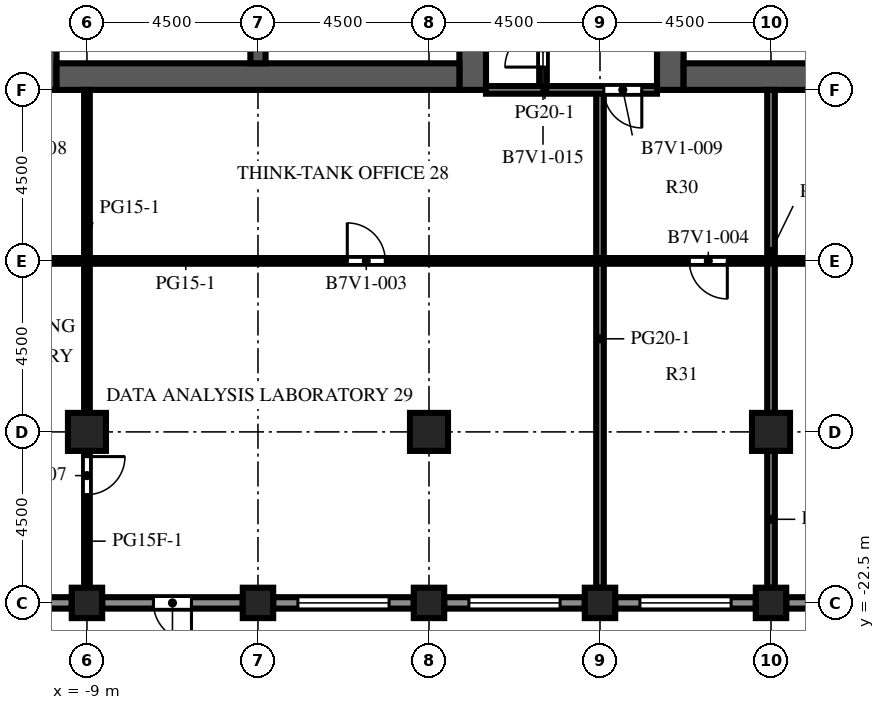
"""IFC4 building model, lengths in metres.
Left out: names, types, materials, properties, quantities, classifications, styles, units other than length and angle.
Written with IfcOpenShell. Run it as: python <this file> out.ifc"""

import sys

from ifc_helpers import new_model, si_unit, direction, frame, frame_2d, origin, origin_2d, place, context, subcontext, project, spatial, rectangle, extrude, element, fill, save


model = new_model("IFC4")
c1 = context("Model", 3, precision=1e-05, world=origin(), true_north=direction((0.0, 1.0)))
c2 = subcontext(c1, "Body", "Model", "MODEL_VIEW")
j1 = project(units=[si_unit("LENGTHUNIT", "METRE"), si_unit("PLANEANGLEUNIT", "RADIAN")], contexts=[c1])
p1 = place(None, origin())
s1 = spatial("IfcSite", under=j1, at=p1, CompositionType="ELEMENT")
p2 = place(p1, origin())
s2 = spatial("IfcBuilding", under=s1, at=p2, CompositionType="ELEMENT")
p3 = place(p2, frame((0.0, 0.0, 252.1)))
s3 = spatial("IfcBuildingStorey", under=s2, at=p3, CompositionType="ELEMENT", Elevation=252.1)
for number, where, z_axis, x_axis in (
    (1, (-9.0, -22.5, 0.0), (0.0, 0.0, 1.0), (1.0, 0.0, 0.0)),
    (2, (-4.5, -22.5, 0.0), (0.0, 0.0, 1.0), (1.0, 0.0, 0.0)),
    (3, (0.0, -22.5, 0.0), (0.0, 0.0, 1.0), (1.0, 0.0, 0.0)),
    (4, (4.5, -22.5, 0.0), (0.0, 0.0, 1.0), (1.0, 0.0, 0.0)),
    (5, (9.0, -22.5, 0.0), (0.0, 0.0, 1.0), (1.0, 0.0, 0.0)),
):
    element("IfcColumn", number, at=place(p3, frame(where, z_axis=z_axis, x_axis=x_axis)), inside=s3, PredefinedType="COLUMN", context=c2, shape_type="SweptSolid", body=[
        extrude(rectangle(XDim=0.8, YDim=0.8, at=origin_2d()), origin(), (0.0, 0.0, 1.0), 4.1),
    ])
for number, where, z_axis, x_axis in (
    (6, (-9.0, -18.0, 0.0), (0.0, 0.0, 1.0), (1.0, 0.0, 0.0)),
    (7, (0.0, -18.0, 0.0), (0.0, 0.0, 1.0), (1.0, 0.0, 0.0)),
    (8, (9.0, -18.0, 0.0), (0.0, 0.0, 1.0), (1.0, 0.0, 0.0)),
):
    element("IfcColumn", number, at=place(p3, frame(where, z_axis=z_axis, x_axis=x_axis)), inside=s3, PredefinedType="COLUMN", context=c2, shape_type="SweptSolid", body=[
        extrude(rectangle(XDim=1.0, YDim=1.0, at=origin_2d()), origin(), (0.0, 0.0, 1.0), 4.1),
    ])
p4 = place(p3, frame((-10.15, -9.0, 0.0), z_axis=(0.0, 0.0, 1.0), x_axis=(0.0, 1.0, 0.0)))
e9 = element("IfcWall", 9, at=p4, inside=s3, PredefinedType="SHEAR", context=c2, shape_type="SweptSolid", body=[
    extrude(rectangle(XDim=27.5, YDim=0.7, at=frame_2d((13.75, 0.0))), origin(), (0.0, 0.0, 1.0), 4.1),
])
p5 = place(p4, frame((12.55, 0.0, 0.0)))
e10 = element("IfcOpeningElement", 10, at=p5, cuts=e9, PredefinedType="OPENING", context=c2, shape_type="SweptSolid", body=[
    extrude(rectangle(XDim=2.4, YDim=2.4, at=frame_2d((1.2, 1.2))), frame((0.0, 0.36, 0.0), z_axis=(0.0, -1.0, 0.0), x_axis=(1.0, 0.0, 0.0)), (0.0, 0.0, 1.0), 0.72),
])
p6 = place(p4, frame((6.825, 0.0, 0.0)))
e11 = element("IfcOpeningElement", 11, at=p6, cuts=e9, PredefinedType="OPENING", context=c2, shape_type="SweptSolid", body=[
    extrude(rectangle(XDim=1.2, YDim=2.1, at=frame_2d((0.6, 1.05))), frame((0.0, 0.36, 0.0), z_axis=(0.0, -1.0, 0.0), x_axis=(1.0, 0.0, 0.0)), (0.0, 0.0, 1.0), 0.72),
])
p7 = place(p4, frame((19.475, 0.0, 0.0)))
e12 = element("IfcOpeningElement", 12, at=p7, cuts=e9, PredefinedType="OPENING", context=c2, shape_type="SweptSolid", body=[
    extrude(rectangle(XDim=1.2, YDim=2.1, at=frame_2d((0.6, 1.05))), frame((0.0, 0.36, 0.0), z_axis=(0.0, -1.0, 0.0), x_axis=(1.0, 0.0, 0.0)), (0.0, 0.0, 1.0), 0.72),
])
p8 = place(p3, frame((1.15, -9.0, 0.0), z_axis=(0.0, 0.0, 1.0), x_axis=(0.0, 1.0, 0.0)))
e13 = element("IfcWall", 13, at=p8, inside=s3, PredefinedType="SHEAR", context=c2, shape_type="SweptSolid", body=[
    extrude(rectangle(XDim=27.5, YDim=0.7, at=frame_2d((13.75, 0.0))), origin(), (0.0, 0.0, 1.0), 4.1),
])
p9 = place(p8, frame((12.55, 0.0, 0.0)))
e14 = element("IfcOpeningElement", 14, at=p9, cuts=e13, PredefinedType="OPENING", context=c2, shape_type="SweptSolid", body=[
    extrude(rectangle(XDim=2.4, YDim=2.4, at=frame_2d((1.2, 1.2))), frame((0.0, 0.36, 0.0), z_axis=(0.0, -1.0, 0.0), x_axis=(1.0, 0.0, 0.0)), (0.0, 0.0, 1.0), 0.72),
])
p10 = place(p8, frame((3.9, 0.0, 0.0)))
e15 = element("IfcOpeningElement", 15, at=p10, cuts=e13, PredefinedType="OPENING", context=c2, shape_type="SweptSolid", body=[
    extrude(rectangle(XDim=1.2, YDim=2.1, at=frame_2d((0.6, 1.05))), frame((0.0, 0.36, 0.0), z_axis=(0.0, -1.0, 0.0), x_axis=(1.0, 0.0, 0.0)), (0.0, 0.0, 1.0), 0.72),
])
p11 = place(p8, frame((22.4, 0.0, 0.0)))
e16 = element("IfcOpeningElement", 16, at=p11, cuts=e13, PredefinedType="OPENING", context=c2, shape_type="SweptSolid", body=[
    extrude(rectangle(XDim=1.2, YDim=2.1, at=frame_2d((0.6, 1.05))), frame((0.0, 0.36, 0.0), z_axis=(0.0, -1.0, 0.0), x_axis=(1.0, 0.0, 0.0)), (0.0, 0.0, 1.0), 0.72),
])
p12 = place(p3, frame((-9.8, -8.65, 0.0), z_axis=(0.0, 0.0, 1.0), x_axis=(1.0, 0.0, 0.0)))
e17 = element("IfcWall", 17, at=p12, inside=s3, PredefinedType="SHEAR", context=c2, shape_type="SweptSolid", body=[
    extrude(rectangle(XDim=10.6, YDim=0.7, at=frame_2d((5.3, 0.0))), origin(), (0.0, 0.0, 1.0), 4.1),
])
p13 = place(p3, frame((-4.5, -8.3, 0.0), z_axis=(0.0, 0.0, 1.0), x_axis=(0.0, 1.0, 0.0)))
e18 = element("IfcWall", 18, at=p13, inside=s3, PredefinedType="SHEAR", context=c2, shape_type="SweptSolid", body=[
    extrude(rectangle(XDim=7.6, YDim=0.4, at=frame_2d((3.8, 0.0))), origin(), (0.0, 0.0, 1.0), 4.1),
])
p14 = place(p3, frame((6.35, -9.0, 0.0), z_axis=(0.0, 0.0, 1.0), x_axis=(0.0, 1.0, 0.0)))
e19 = element("IfcWall", 19, at=p14, inside=s3, PredefinedType="SHEAR", context=c2, shape_type="SweptSolid", body=[
    extrude(rectangle(XDim=27.5, YDim=0.7, at=frame_2d((13.75, 0.0))), origin(), (0.0, 0.0, 1.0), 4.1),
])
p15 = place(p14, frame((12.55, 0.0, 0.0)))
e20 = element("IfcOpeningElement", 20, at=p15, cuts=e19, PredefinedType="OPENING", context=c2, shape_type="SweptSolid", body=[
    extrude(rectangle(XDim=2.4, YDim=2.4, at=frame_2d((1.2, 1.2))), frame((0.0, 0.36, 0.0), z_axis=(0.0, -1.0, 0.0), x_axis=(1.0, 0.0, 0.0)), (0.0, 0.0, 1.0), 0.72),
])
p16 = place(p14, frame((3.9, 0.0, 0.0)))
e21 = element("IfcOpeningElement", 21, at=p16, cuts=e19, PredefinedType="OPENING", context=c2, shape_type="SweptSolid", body=[
    extrude(rectangle(XDim=1.2, YDim=2.1, at=frame_2d((0.6, 1.05))), frame((0.0, 0.36, 0.0), z_axis=(0.0, -1.0, 0.0), x_axis=(1.0, 0.0, 0.0)), (0.0, 0.0, 1.0), 0.72),
])
p17 = place(p14, frame((22.4, 0.0, 0.0)))
e22 = element("IfcOpeningElement", 22, at=p17, cuts=e19, PredefinedType="OPENING", context=c2, shape_type="SweptSolid", body=[
    extrude(rectangle(XDim=1.2, YDim=2.1, at=frame_2d((0.6, 1.05))), frame((0.0, 0.36, 0.0), z_axis=(0.0, -1.0, 0.0), x_axis=(1.0, 0.0, 0.0)), (0.0, 0.0, 1.0), 0.72),
])
p18 = place(p3, frame((6.7, -8.65, 0.0), z_axis=(0.0, 0.0, 1.0), x_axis=(1.0, 0.0, 0.0)))
e23 = element("IfcWall", 23, at=p18, inside=s3, PredefinedType="SHEAR", context=c2, shape_type="SweptSolid", body=[
    extrude(rectangle(XDim=10.6, YDim=0.7, at=frame_2d((5.3, 0.0))), origin(), (0.0, 0.0, 1.0), 4.1),
])
p19 = place(p3, frame((-9.4, -22.5, 0.0), z_axis=(0.0, 0.0, 1.0), x_axis=(-1.0, 0.0, 0.0)))
e24 = element("IfcWall", 24, at=p19, inside=s3, PredefinedType="SOLIDWALL", context=c2, shape_type="SweptSolid", body=[
    extrude(rectangle(XDim=3.7, YDim=0.3, at=frame_2d((1.85, 0.0))), origin(), (0.0, 0.0, 1.0), 2.85),
])
p20 = place(p19, frame((0.65, 0.0, 0.8)))
e25 = element("IfcOpeningElement", 25, at=p20, cuts=e24, PredefinedType="OPENING", context=c2, shape_type="SweptSolid", body=[
    extrude(rectangle(XDim=2.4, YDim=1.7, at=frame_2d((1.2, 0.85))), frame((0.0, 0.16, 0.0), z_axis=(0.0, -1.0, 0.0), x_axis=(1.0, 0.0, 0.0)), (0.0, 0.0, 1.0), 0.32),
])
p21 = place(p3, frame((-4.9, -22.5, 0.0), z_axis=(0.0, 0.0, 1.0), x_axis=(-1.0, 0.0, 0.0)))
e26 = element("IfcWall", 26, at=p21, inside=s3, PredefinedType="SOLIDWALL", context=c2, shape_type="SweptSolid", body=[
    extrude(rectangle(XDim=3.7, YDim=0.3, at=frame_2d((1.85, 0.0))), origin(), (0.0, 0.0, 1.0), 2.85),
])
p22 = place(p21, frame((1.35, 0.0, 0.0)))
e27 = element("IfcOpeningElement", 27, at=p22, cuts=e26, PredefinedType="OPENING", context=c2, shape_type="SweptSolid", body=[
    extrude(rectangle(XDim=1.0, YDim=2.2, at=frame_2d((0.5, 1.1))), frame((0.0, 0.16, 0.0), z_axis=(0.0, -1.0, 0.0), x_axis=(1.0, 0.0, 0.0)), (0.0, 0.0, 1.0), 0.32),
])
p23 = place(p3, frame((-0.4, -22.5, 0.0), z_axis=(0.0, 0.0, 1.0), x_axis=(-1.0, 0.0, 0.0)))
e28 = element("IfcWall", 28, at=p23, inside=s3, PredefinedType="SOLIDWALL", context=c2, shape_type="SweptSolid", body=[
    extrude(rectangle(XDim=3.7, YDim=0.3, at=frame_2d((1.85, 0.0))), origin(), (0.0, 0.0, 1.0), 2.85),
])
p24 = place(p23, frame((0.65, 0.0, 0.8)))
e29 = element("IfcOpeningElement", 29, at=p24, cuts=e28, PredefinedType="OPENING", context=c2, shape_type="SweptSolid", body=[
    extrude(rectangle(XDim=2.4, YDim=1.7, at=frame_2d((1.2, 0.85))), frame((0.0, 0.16, 0.0), z_axis=(0.0, -1.0, 0.0), x_axis=(1.0, 0.0, 0.0)), (0.0, 0.0, 1.0), 0.32),
])
p25 = place(p3, frame((4.1, -22.5, 0.0), z_axis=(0.0, 0.0, 1.0), x_axis=(-1.0, 0.0, 0.0)))
e30 = element("IfcWall", 30, at=p25, inside=s3, PredefinedType="SOLIDWALL", context=c2, shape_type="SweptSolid", body=[
    extrude(rectangle(XDim=3.7, YDim=0.3, at=frame_2d((1.85, 0.0))), origin(), (0.0, 0.0, 1.0), 2.85),
])
p26 = place(p25, frame((0.65, 0.0, 0.8)))
e31 = element("IfcOpeningElement", 31, at=p26, cuts=e30, PredefinedType="OPENING", context=c2, shape_type="SweptSolid", body=[
    extrude(rectangle(XDim=2.4, YDim=1.7, at=frame_2d((1.2, 0.85))), frame((0.0, 0.16, 0.0), z_axis=(0.0, -1.0, 0.0), x_axis=(1.0, 0.0, 0.0)), (0.0, 0.0, 1.0), 0.32),
])
p27 = place(p3, frame((8.6, -22.5, 0.0), z_axis=(0.0, 0.0, 1.0), x_axis=(-1.0, 0.0, 0.0)))
e32 = element("IfcWall", 32, at=p27, inside=s3, PredefinedType="SOLIDWALL", context=c2, shape_type="SweptSolid", body=[
    extrude(rectangle(XDim=3.7, YDim=0.3, at=frame_2d((1.85, 0.0))), origin(), (0.0, 0.0, 1.0), 2.85),
])
p28 = place(p27, frame((0.65, 0.0, 0.8)))
e33 = element("IfcOpeningElement", 33, at=p28, cuts=e32, PredefinedType="OPENING", context=c2, shape_type="SweptSolid", body=[
    extrude(rectangle(XDim=2.4, YDim=1.7, at=frame_2d((1.2, 0.85))), frame((0.0, 0.16, 0.0), z_axis=(0.0, -1.0, 0.0), x_axis=(1.0, 0.0, 0.0)), (0.0, 0.0, 1.0), 0.32),
])
p29 = place(p3, frame((13.1, -22.5, 0.0), z_axis=(0.0, 0.0, 1.0), x_axis=(-1.0, 0.0, 0.0)))
e34 = element("IfcWall", 34, at=p29, inside=s3, PredefinedType="SOLIDWALL", context=c2, shape_type="SweptSolid", body=[
    extrude(rectangle(XDim=3.7, YDim=0.3, at=frame_2d((1.85, 0.0))), origin(), (0.0, 0.0, 1.0), 2.85),
])
p30 = place(p29, frame((0.65, 0.0, 0.8)))
e35 = element("IfcOpeningElement", 35, at=p30, cuts=e34, PredefinedType="OPENING", context=c2, shape_type="SweptSolid", body=[
    extrude(rectangle(XDim=2.4, YDim=1.7, at=frame_2d((1.2, 0.85))), frame((0.0, 0.16, 0.0), z_axis=(0.0, -1.0, 0.0), x_axis=(1.0, 0.0, 0.0)), (0.0, 0.0, 1.0), 0.32),
])
p31 = place(p3, frame((-0.7, -8.3, 0.0), z_axis=(0.0, 0.0, 1.0), x_axis=(0.0, 1.0, 0.0)))
e36 = element("IfcWall", 36, at=p31, inside=s3, PredefinedType="PARTITIONING", context=c2, shape_type="SweptSolid", body=[
    extrude(rectangle(XDim=2.584, YDim=0.1, at=frame_2d((1.292, 0.0))), origin(), (0.0, 0.0, 1.0), 3.65),
])
p32 = place(p31, frame((0.792, 0.0, 0.0)))
e37 = element("IfcOpeningElement", 37, at=p32, cuts=e36, PredefinedType="OPENING", context=c2, shape_type="SweptSolid", body=[
    extrude(rectangle(XDim=1.0, YDim=2.1, at=frame_2d((0.5, 1.05))), frame((0.0, 0.06, 0.0), z_axis=(0.0, -1.0, 0.0), x_axis=(1.0, 0.0, 0.0)), (0.0, 0.0, 1.0), 0.12),
])
p33 = place(p3, frame((8.2, -8.3, 0.0), z_axis=(0.0, 0.0, 1.0), x_axis=(0.0, 1.0, 0.0)))
e38 = element("IfcWall", 38, at=p33, inside=s3, PredefinedType="PARTITIONING", context=c2, shape_type="SweptSolid", body=[
    extrude(rectangle(XDim=2.584, YDim=0.1, at=frame_2d((1.292, 0.0))), origin(), (0.0, 0.0, 1.0), 3.65),
])
p34 = place(p33, frame((0.792, 0.0, 0.0)))
e39 = element("IfcOpeningElement", 39, at=p34, cuts=e38, PredefinedType="OPENING", context=c2, shape_type="SweptSolid", body=[
    extrude(rectangle(XDim=1.0, YDim=2.1, at=frame_2d((0.5, 1.05))), frame((0.0, 0.06, 0.0), z_axis=(0.0, -1.0, 0.0), x_axis=(1.0, 0.0, 0.0)), (0.0, 0.0, 1.0), 0.12),
])
p35 = place(p3, frame((-9.0, -18.5, 0.0), z_axis=(0.0, 0.0, 1.0), x_axis=(0.0, -1.0, 0.0)))
e40 = element("IfcWall", 40, at=p35, inside=s3, PredefinedType="PARTITIONING", context=c2, shape_type="SweptSolid", body=[
    extrude(rectangle(XDim=3.6, YDim=0.15, at=frame_2d((1.8, 0.0))), origin(), (0.0, 0.0, 1.0), 3.65),
])
p36 = place(p35, frame((0.15, 0.0, 0.0)))
e41 = element("IfcOpeningElement", 41, at=p36, cuts=e40, PredefinedType="OPENING", context=c2, shape_type="SweptSolid", body=[
    extrude(rectangle(XDim=1.0, YDim=2.1, at=frame_2d((0.5, 1.05))), frame((0.0, 0.085, 0.0), z_axis=(0.0, -1.0, 0.0), x_axis=(1.0, 0.0, 0.0)), (0.0, 0.0, 1.0), 0.17),
])
p37 = place(p3, frame((-9.0, -17.5, 0.0), z_axis=(0.0, 0.0, 1.0), x_axis=(0.0, 1.0, 0.0)))
e42 = element("IfcWall", 42, at=p37, inside=s3, PredefinedType="PARTITIONING", context=c2, shape_type="SweptSolid", body=[
    extrude(rectangle(XDim=8.5, YDim=0.15, at=frame_2d((4.25, 0.0))), origin(), (0.0, 0.0, 1.0), 3.65),
])
p38 = place(p3, frame((3.0, -9.0, 0.0), z_axis=(0.0, 0.0, 1.0), x_axis=(0.0, 1.0, 0.0)))
e43 = element("IfcWall", 43, at=p38, inside=s3, PredefinedType="PARTITIONING", context=c2, shape_type="SweptSolid", body=[
    extrude(rectangle(XDim=3.0, YDim=0.2, at=frame_2d((1.5, 0.0))), origin(), (0.0, 0.0, 1.0), 3.65),
])
p39 = place(p38, frame((0.6, 0.0, 0.0)))
e44 = element("IfcOpeningElement", 44, at=p39, cuts=e43, PredefinedType="OPENING", context=c2, shape_type="SweptSolid", body=[
    extrude(rectangle(XDim=1.0, YDim=2.1, at=frame_2d((0.5, 1.05))), frame((0.0, 0.11, 0.0), z_axis=(0.0, -1.0, 0.0), x_axis=(1.0, 0.0, 0.0)), (0.0, 0.0, 1.0), 0.22),
])
p40 = place(p3, frame((4.5, -22.1, 0.0), z_axis=(0.0, 0.0, 1.0), x_axis=(0.0, 1.0, 0.0)))
e45 = element("IfcWall", 45, at=p40, inside=s3, PredefinedType="PARTITIONING", context=c2, shape_type="SweptSolid", body=[
    extrude(rectangle(XDim=13.1, YDim=0.2, at=frame_2d((6.55, 0.0))), origin(), (0.0, 0.0, 1.0), 3.65),
])
p41 = place(p3, frame((9.0, -22.1, 0.0), z_axis=(0.0, 0.0, 1.0), x_axis=(0.0, 1.0, 0.0)))
e46 = element("IfcWall", 46, at=p41, inside=s3, PredefinedType="PARTITIONING", context=c2, shape_type="SweptSolid", body=[
    extrude(rectangle(XDim=3.6, YDim=0.2, at=frame_2d((1.8, 0.0))), origin(), (0.0, 0.0, 1.0), 3.65),
])
p42 = place(p3, frame((9.0, -17.5, 0.0), z_axis=(0.0, 0.0, 1.0), x_axis=(0.0, 1.0, 0.0)))
e47 = element("IfcWall", 47, at=p42, inside=s3, PredefinedType="PARTITIONING", context=c2, shape_type="SweptSolid", body=[
    extrude(rectangle(XDim=8.5, YDim=0.2, at=frame_2d((4.25, 0.0))), origin(), (0.0, 0.0, 1.0), 3.65),
])
p43 = place(p3, frame((21.0, -13.5, 0.0), z_axis=(0.0, 0.0, 1.0), x_axis=(-1.0, 0.0, 0.0)))
e48 = element("IfcWall", 48, at=p43, inside=s3, PredefinedType="PARTITIONING", context=c2, shape_type="SweptSolid", body=[
    extrude(rectangle(XDim=34.5, YDim=0.15, at=frame_2d((17.25, 0.0))), origin(), (0.0, 0.0, 1.0), 3.65),
])
p44 = place(p43, frame((31.65, 0.0, 0.0)))
e49 = element("IfcOpeningElement", 49, at=p44, cuts=e48, PredefinedType="OPENING", context=c2, shape_type="SweptSolid", body=[
    extrude(rectangle(XDim=1.0, YDim=2.1, at=frame_2d((0.5, 1.05))), frame((0.0, 0.085, 0.0), z_axis=(0.0, -1.0, 0.0), x_axis=(1.0, 0.0, 0.0)), (0.0, 0.0, 1.0), 0.17),
])
p45 = place(p43, frame((22.15, 0.0, 0.0)))
e50 = element("IfcOpeningElement", 50, at=p45, cuts=e48, PredefinedType="OPENING", context=c2, shape_type="SweptSolid", body=[
    extrude(rectangle(XDim=1.0, YDim=2.1, at=frame_2d((0.5, 1.05))), frame((0.0, 0.085, 0.0), z_axis=(0.0, -1.0, 0.0), x_axis=(1.0, 0.0, 0.0)), (0.0, 0.0, 1.0), 0.17),
])
p46 = place(p43, frame((13.15, 0.0, 0.0)))
e51 = element("IfcOpeningElement", 51, at=p46, cuts=e48, PredefinedType="OPENING", context=c2, shape_type="SweptSolid", body=[
    extrude(rectangle(XDim=1.0, YDim=2.1, at=frame_2d((0.5, 1.05))), frame((0.0, 0.085, 0.0), z_axis=(0.0, -1.0, 0.0), x_axis=(1.0, 0.0, 0.0)), (0.0, 0.0, 1.0), 0.17),
])
p47 = place(p43, frame((6.15, 0.0, 0.0)))
e52 = element("IfcOpeningElement", 52, at=p47, cuts=e48, PredefinedType="OPENING", context=c2, shape_type="SweptSolid", body=[
    extrude(rectangle(XDim=1.0, YDim=2.1, at=frame_2d((0.5, 1.05))), frame((0.0, 0.085, 0.0), z_axis=(0.0, -1.0, 0.0), x_axis=(1.0, 0.0, 0.0)), (0.0, 0.0, 1.0), 0.17),
])
p48 = place(p3, frame((6.0, -9.0, 0.0), z_axis=(0.0, 0.0, 1.0), x_axis=(-1.0, 0.0, 0.0)))
e53 = element("IfcWall", 53, at=p48, inside=s3, PredefinedType="PARTITIONING", context=c2, shape_type="SweptSolid", body=[
    extrude(rectangle(XDim=4.5, YDim=0.2, at=frame_2d((2.25, 0.0))), origin(), (0.0, 0.0, 1.0), 3.65),
])
p49 = place(p48, frame((0.4, 0.0, 0.0)))
e54 = element("IfcOpeningElement", 54, at=p49, cuts=e53, PredefinedType="OPENING", context=c2, shape_type="SweptSolid", body=[
    extrude(rectangle(XDim=1.0, YDim=2.1, at=frame_2d((0.5, 1.05))), frame((0.0, 0.11, 0.0), z_axis=(0.0, -1.0, 0.0), x_axis=(1.0, 0.0, 0.0)), (0.0, 0.0, 1.0), 0.22),
])
p50 = place(p22, origin())
e55 = element("IfcDoor", 55, at=p50, inside=s3, OperationType="SINGLE_SWING_LEFT", PredefinedType="DOOR", context=c2, shape_type="SweptSolid", body=[
    extrude(rectangle(XDim=1.0, YDim=2.2, at=frame_2d((0.5, 1.1))), frame((0.0, 0.025, 0.0), z_axis=(0.0, -1.0, 0.0), x_axis=(1.0, 0.0, 0.0)), (0.0, 0.0, 1.0), 0.05),
])
fill(e27, e55)
p51 = place(p24, origin())
e56 = element("IfcWindow", 56, at=p51, inside=s3, PartitioningType="SINGLE_PANEL", PredefinedType="WINDOW", context=c2, shape_type="SweptSolid", body=[
    extrude(rectangle(XDim=2.4, YDim=1.7, at=frame_2d((1.2, 0.85))), frame((0.0, 0.03, 0.0), z_axis=(0.0, -1.0, 0.0), x_axis=(1.0, 0.0, 0.0)), (0.0, 0.0, 1.0), 0.06),
])
fill(e29, e56)
p52 = place(p26, origin())
e57 = element("IfcWindow", 57, at=p52, inside=s3, PartitioningType="SINGLE_PANEL", PredefinedType="WINDOW", context=c2, shape_type="SweptSolid", body=[
    extrude(rectangle(XDim=2.4, YDim=1.7, at=frame_2d((1.2, 0.85))), frame((0.0, 0.03, 0.0), z_axis=(0.0, -1.0, 0.0), x_axis=(1.0, 0.0, 0.0)), (0.0, 0.0, 1.0), 0.06),
])
fill(e31, e57)
p53 = place(p28, origin())
e58 = element("IfcWindow", 58, at=p53, inside=s3, PartitioningType="SINGLE_PANEL", PredefinedType="WINDOW", context=c2, shape_type="SweptSolid", body=[
    extrude(rectangle(XDim=2.4, YDim=1.7, at=frame_2d((1.2, 0.85))), frame((0.0, 0.03, 0.0), z_axis=(0.0, -1.0, 0.0), x_axis=(1.0, 0.0, 0.0)), (0.0, 0.0, 1.0), 0.06),
])
fill(e33, e58)
p54 = place(p45, origin())
e59 = element("IfcDoor", 59, at=p54, inside=s3, OperationType="SINGLE_SWING_RIGHT", PredefinedType="DOOR", context=c2, shape_type="SweptSolid", body=[
    extrude(rectangle(XDim=1.0, YDim=2.1, at=frame_2d((0.5, 1.05))), frame((0.0, 0.025, 0.0), z_axis=(0.0, -1.0, 0.0), x_axis=(1.0, 0.0, 0.0)), (0.0, 0.0, 1.0), 0.05),
])
fill(e50, e59)
p55 = place(p46, origin())
e60 = element("IfcDoor", 60, at=p55, inside=s3, OperationType="SINGLE_SWING_LEFT", PredefinedType="DOOR", context=c2, shape_type="SweptSolid", body=[
    extrude(rectangle(XDim=1.0, YDim=2.1, at=frame_2d((0.5, 1.05))), frame((0.0, 0.025, 0.0), z_axis=(0.0, -1.0, 0.0), x_axis=(1.0, 0.0, 0.0)), (0.0, 0.0, 1.0), 0.05),
])
fill(e51, e60)
p56 = place(p36, origin())
e61 = element("IfcDoor", 61, at=p56, inside=s3, OperationType="SINGLE_SWING_LEFT", PredefinedType="DOOR", context=c2, shape_type="SweptSolid", body=[
    extrude(rectangle(XDim=1.0, YDim=2.1, at=frame_2d((0.5, 1.05))), frame((0.0, 0.025, 0.0), z_axis=(0.0, -1.0, 0.0), x_axis=(1.0, 0.0, 0.0)), (0.0, 0.0, 1.0), 0.05),
])
fill(e41, e61)
p57 = place(p49, origin())
e62 = element("IfcDoor", 62, at=p57, inside=s3, OperationType="SINGLE_SWING_LEFT", PredefinedType="DOOR", context=c2, shape_type="SweptSolid", body=[
    extrude(rectangle(XDim=1.0, YDim=2.1, at=frame_2d((0.5, 1.05))), frame((0.0, 0.025, 0.0), z_axis=(0.0, -1.0, 0.0), x_axis=(1.0, 0.0, 0.0)), (0.0, 0.0, 1.0), 0.05),
])
fill(e54, e62)
p58 = place(p39, origin())
e63 = element("IfcDoor", 63, at=p58, inside=s3, OperationType="SINGLE_SWING_LEFT", PredefinedType="DOOR", context=c2, shape_type="SweptSolid", body=[
    extrude(rectangle(XDim=1.0, YDim=2.1, at=frame_2d((0.5, 1.05))), frame((0.0, 0.025, 0.0), z_axis=(0.0, -1.0, 0.0), x_axis=(1.0, 0.0, 0.0)), (0.0, 0.0, 1.0), 0.05),
])
fill(e44, e63)
save(model, sys.argv[1])
